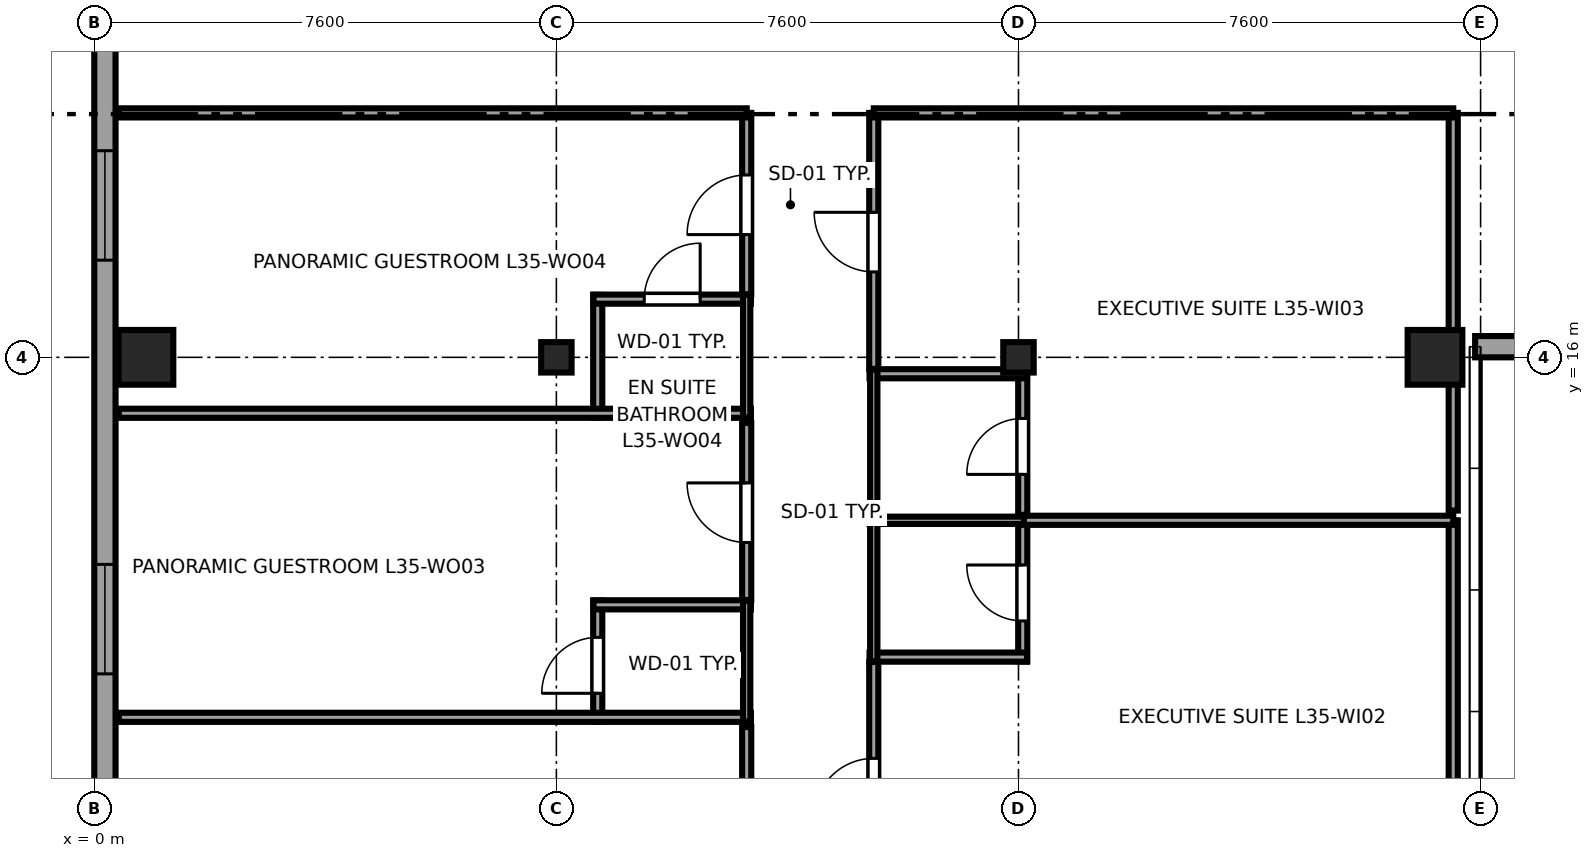
"""IFC4 building model, lengths in metres.
Left out: names, types, materials, properties, quantities, classifications, styles, units other than length and angle.
Written with IfcOpenShell. Run it as: python <this file> out.ifc"""

import sys

from ifc_helpers import new_model, si_unit, direction, frame, frame_2d, origin, origin_2d, place, context, subcontext, project, spatial, rectangle, i_section, extrude, source, transform, mapped, element, fill, save


model = new_model("IFC4")
c1 = context("Model", 3, precision=1e-05, world=origin(), true_north=direction((0.0, 1.0)))
c2 = subcontext(c1, "Body", "Model", "MODEL_VIEW")
j1 = project(units=[si_unit("LENGTHUNIT", "METRE"), si_unit("PLANEANGLEUNIT", "RADIAN")], contexts=[c1])
p1 = place(None, origin())
s1 = spatial("IfcSite", under=j1, at=p1, CompositionType="ELEMENT")
p2 = place(p1, origin())
s2 = spatial("IfcBuilding", under=s1, at=p2, CompositionType="ELEMENT")
p3 = place(p2, frame((0.0, 0.0, 136.4)))
s3 = spatial("IfcBuildingStorey", under=s2, at=p3, CompositionType="ELEMENT", Elevation=136.4)
m1 = source(origin(), c2, "Body", "SweptSolid", [
    extrude(rectangle(XDim=0.9, YDim=0.9, at=origin_2d()), origin(), (0.0, 0.0, 1.0), 3.55),
])
p4 = place(p3, frame((0.85, 16.0, 0.0), z_axis=(0.0, 0.0, 1.0), x_axis=(1.0, 0.0, 0.0)))
e1 = element("IfcColumn", 1, at=p4, inside=s3, PredefinedType="COLUMN", context=c2, shape_type="MappedRepresentation", body=[
    mapped(m1, transform((0.0, 0.0, 0.0), x_axis=(1.0, 0.0, 0.0), y_axis=(0.0, 1.0, 0.0), z_axis=(0.0, 0.0, 1.0), scale=1.0)),
])
m2 = source(origin(), c2, "Body", "SweptSolid", [
    extrude(i_section(OverallWidth=0.5, OverallDepth=0.5, WebThickness=0.022, FlangeThickness=0.034, at=origin_2d()), origin(), (0.0, 0.0, 1.0), 3.55),
])
for number, where, z_axis, x_axis in (
    (2, (7.6, 16.0, 0.0), (0.0, 0.0, 1.0), (1.0, 0.0, 0.0)),
    (3, (15.2, 16.0, 0.0), (0.0, 0.0, 1.0), (1.0, 0.0, 0.0)),
):
    element("IfcColumn", number, at=place(p3, frame(where, z_axis=z_axis, x_axis=x_axis)), inside=s3, PredefinedType="COLUMN", context=c2, shape_type="MappedRepresentation", body=[
        mapped(m2, transform((0.0, 0.0, 0.0), x_axis=(1.0, 0.0, 0.0), y_axis=(0.0, 1.0, 0.0), z_axis=(0.0, 0.0, 1.0), scale=1.0)),
    ])
p5 = place(p3, frame((22.05, 16.0, 0.0), z_axis=(0.0, 0.0, 1.0), x_axis=(1.0, 0.0, 0.0)))
e4 = element("IfcColumn", 4, at=p5, inside=s3, PredefinedType="COLUMN", context=c2, shape_type="MappedRepresentation", body=[
    mapped(m1, transform((0.0, 0.0, 0.0), x_axis=(1.0, 0.0, 0.0), y_axis=(0.0, 1.0, 0.0), z_axis=(0.0, 0.0, 1.0), scale=1.0)),
])
p6 = place(p3, frame((22.71, 16.175, 0.0), z_axis=(0.0, 0.0, 1.0), x_axis=(1.0, 0.0, 0.0)))
e5 = element("IfcWall", 5, at=p6, inside=s3, PredefinedType="SOLIDWALL", context=c2, shape_type="SweptSolid", body=[
    extrude(rectangle(XDim=11.58, YDim=0.35, at=frame_2d((5.79, 0.0))), origin(), (0.0, 0.0, 1.0), 2.748),
])
p7 = place(p6, frame((2.295, 0.0, 0.68)))
e6 = element("IfcOpeningElement", 6, at=p7, cuts=e5, PredefinedType="OPENING", context=c2, shape_type="SweptSolid", body=[
    extrude(rectangle(XDim=1.8, YDim=1.85, at=frame_2d((0.9, 0.925))), frame((0.0, 0.185, 0.0), z_axis=(0.0, -1.0, 0.0), x_axis=(1.0, 0.0, 0.0)), (0.0, 0.0, 1.0), 0.37),
])
p8 = place(p6, frame((7.485, 0.0, 0.68)))
e7 = element("IfcOpeningElement", 7, at=p8, cuts=e5, PredefinedType="OPENING", context=c2, shape_type="SweptSolid", body=[
    extrude(rectangle(XDim=1.8, YDim=1.85, at=frame_2d((0.9, 0.925))), frame((0.0, 0.185, 0.0), z_axis=(0.0, -1.0, 0.0), x_axis=(1.0, 0.0, 0.0)), (0.0, 0.0, 1.0), 0.37),
])
p9 = place(p3, frame((0.175, 41.383, 0.0), z_axis=(0.0, 0.0, 1.0), x_axis=(0.0, -1.0, 0.0)))
e8 = element("IfcWall", 8, at=p9, inside=s3, PredefinedType="SOLIDWALL", context=c2, shape_type="SweptSolid", body=[
    extrude(rectangle(XDim=36.766, YDim=0.35, at=frame_2d((18.383, 0.0))), origin(), (0.0, 0.0, 1.0), 3.37),
])
p10 = place(p9, frame((0.626, 0.0, 0.68)))
e9 = element("IfcOpeningElement", 9, at=p10, cuts=e8, PredefinedType="OPENING", context=c2, shape_type="SweptSolid", body=[
    extrude(rectangle(XDim=1.8, YDim=1.85, at=frame_2d((0.9, 0.925))), frame((0.0, 0.185, 0.0), z_axis=(0.0, -1.0, 0.0), x_axis=(1.0, 0.0, 0.0)), (0.0, 0.0, 1.0), 0.37),
])
p11 = place(p9, frame((9.579, 0.0, 0.68)))
e10 = element("IfcOpeningElement", 10, at=p11, cuts=e8, PredefinedType="OPENING", context=c2, shape_type="SweptSolid", body=[
    extrude(rectangle(XDim=1.8, YDim=1.85, at=frame_2d((0.9, 0.925))), frame((0.0, 0.185, 0.0), z_axis=(0.0, -1.0, 0.0), x_axis=(1.0, 0.0, 0.0)), (0.0, 0.0, 1.0), 0.37),
])
p12 = place(p9, frame((13.531, 0.0, 0.68)))
e11 = element("IfcOpeningElement", 11, at=p12, cuts=e8, PredefinedType="OPENING", context=c2, shape_type="SweptSolid", body=[
    extrude(rectangle(XDim=1.8, YDim=1.85, at=frame_2d((0.9, 0.925))), frame((0.0, 0.185, 0.0), z_axis=(0.0, -1.0, 0.0), x_axis=(1.0, 0.0, 0.0)), (0.0, 0.0, 1.0), 0.37),
])
p13 = place(p9, frame((21.985, 0.0, 0.68)))
e12 = element("IfcOpeningElement", 12, at=p13, cuts=e8, PredefinedType="OPENING", context=c2, shape_type="SweptSolid", body=[
    extrude(rectangle(XDim=1.8, YDim=1.85, at=frame_2d((0.9, 0.925))), frame((0.0, 0.185, 0.0), z_axis=(0.0, -1.0, 0.0), x_axis=(1.0, 0.0, 0.0)), (0.0, 0.0, 1.0), 0.37),
])
p14 = place(p9, frame((28.788, 0.0, 0.68)))
e13 = element("IfcOpeningElement", 13, at=p14, cuts=e8, PredefinedType="OPENING", context=c2, shape_type="SweptSolid", body=[
    extrude(rectangle(XDim=1.8, YDim=1.85, at=frame_2d((0.9, 0.925))), frame((0.0, 0.185, 0.0), z_axis=(0.0, -1.0, 0.0), x_axis=(1.0, 0.0, 0.0)), (0.0, 0.0, 1.0), 0.37),
])
p15 = place(p9, frame((34.34, 0.0, 0.68)))
e14 = element("IfcOpeningElement", 14, at=p15, cuts=e8, PredefinedType="OPENING", context=c2, shape_type="SweptSolid", body=[
    extrude(rectangle(XDim=1.8, YDim=1.85, at=frame_2d((0.9, 0.925))), frame((0.0, 0.185, 0.0), z_axis=(0.0, -1.0, 0.0), x_axis=(1.0, 0.0, 0.0)), (0.0, 0.0, 1.0), 0.37),
])
p16 = place(p3, frame((8.28, 10.01, 0.0), z_axis=(0.0, 0.0, 1.0), x_axis=(0.0, 1.0, 0.0)))
e15 = element("IfcWall", 15, at=p16, inside=s3, PredefinedType="PARTITIONING", context=c2, shape_type="SweptSolid", body=[
    extrude(rectangle(XDim=1.99, YDim=0.15, at=frame_2d((0.995, 0.0))), origin(), (0.0, 0.0, 1.0), 3.37),
])
p17 = place(p16, frame((0.465, 0.0, 0.0)))
e16 = element("IfcOpeningElement", 16, at=p17, cuts=e15, PredefinedType="OPENING", context=c2, shape_type="SweptSolid", body=[
    extrude(rectangle(XDim=0.92, YDim=2.01, at=frame_2d((0.46, 1.005))), frame((0.0, 0.085, 0.0), z_axis=(0.0, -1.0, 0.0), x_axis=(1.0, 0.0, 0.0)), (0.0, 0.0, 1.0), 0.17),
])
p18 = place(p3, frame((0.405, 10.08, 0.0), z_axis=(0.0, 0.0, 1.0), x_axis=(1.0, 0.0, 0.0)))
e17 = element("IfcWall", 17, at=p18, inside=s3, PredefinedType="PARTITIONING", context=c2, shape_type="SweptSolid", body=[
    extrude(rectangle(XDim=10.395, YDim=0.15, at=frame_2d((5.198, 0.0))), origin(), (0.0, 0.0, 1.0), 3.37),
])
p19 = place(p3, frame((8.21, 11.93, 0.0), z_axis=(0.0, 0.0, 1.0), x_axis=(1.0, 0.0, 0.0)))
e18 = element("IfcWall", 18, at=p19, inside=s3, PredefinedType="PARTITIONING", context=c2, shape_type="SweptSolid", body=[
    extrude(rectangle(XDim=2.59, YDim=0.15, at=frame_2d((1.295, 0.0))), origin(), (0.0, 0.0, 1.0), 3.37),
])
p20 = place(p3, frame((10.73, 10.01, 0.0), z_axis=(0.0, 0.0, 1.0), x_axis=(0.0, 1.0, 0.0)))
e19 = element("IfcWall", 19, at=p20, inside=s3, PredefinedType="PLUMBINGWALL", context=c2, shape_type="SweptSolid", body=[
    extrude(rectangle(XDim=1.99, YDim=0.12, at=frame_2d((0.995, 0.0))), origin(), (0.0, 0.0, 1.0), 3.37),
])
p21 = place(p3, frame((8.28, 15.01, 0.0), z_axis=(0.0, 0.0, 1.0), x_axis=(0.0, 1.0, 0.0)))
e20 = element("IfcWall", 20, at=p21, inside=s3, PredefinedType="PARTITIONING", context=c2, shape_type="SweptSolid", body=[
    extrude(rectangle(XDim=2.017, YDim=0.15, at=frame_2d((1.009, 0.0))), origin(), (0.0, 0.0, 1.0), 3.37),
])
p22 = place(p3, frame((0.405, 15.08, 0.0), z_axis=(0.0, 0.0, 1.0), x_axis=(1.0, 0.0, 0.0)))
e21 = element("IfcWall", 21, at=p22, inside=s3, PredefinedType="PARTITIONING", context=c2, shape_type="SweptSolid", body=[
    extrude(rectangle(XDim=10.395, YDim=0.15, at=frame_2d((5.198, 0.0))), origin(), (0.0, 0.0, 1.0), 3.37),
])
p23 = place(p3, frame((8.21, 16.957, 0.0), z_axis=(0.0, 0.0, 1.0), x_axis=(1.0, 0.0, 0.0)))
e22 = element("IfcWall", 22, at=p23, inside=s3, PredefinedType="PARTITIONING", context=c2, shape_type="SweptSolid", body=[
    extrude(rectangle(XDim=2.59, YDim=0.15, at=frame_2d((1.295, 0.0))), origin(), (0.0, 0.0, 1.0), 3.37),
])
p24 = place(p23, frame((0.835, 0.0, 0.0)))
e23 = element("IfcOpeningElement", 23, at=p24, cuts=e22, PredefinedType="OPENING", context=c2, shape_type="SweptSolid", body=[
    extrude(rectangle(XDim=0.92, YDim=2.01, at=frame_2d((0.46, 1.005))), frame((0.0, 0.085, 0.0), z_axis=(0.0, -1.0, 0.0), x_axis=(1.0, 0.0, 0.0)), (0.0, 0.0, 1.0), 0.17),
])
p25 = place(p3, frame((10.73, 15.01, 0.0), z_axis=(0.0, 0.0, 1.0), x_axis=(0.0, 1.0, 0.0)))
e24 = element("IfcWall", 24, at=p25, inside=s3, PredefinedType="PLUMBINGWALL", context=c2, shape_type="SweptSolid", body=[
    extrude(rectangle(XDim=2.017, YDim=0.12, at=frame_2d((1.009, 0.0))), origin(), (0.0, 0.0, 1.0), 3.37),
])
p26 = place(p3, frame((15.27, 11.0, 0.0), z_axis=(0.0, 0.0, 1.0), x_axis=(0.0, 1.0, 0.0)))
e25 = element("IfcWall", 25, at=p26, inside=s3, PredefinedType="PARTITIONING", context=c2, shape_type="SweptSolid", body=[
    extrude(rectangle(XDim=2.39, YDim=0.15, at=frame_2d((1.195, 0.0))), origin(), (0.0, 0.0, 1.0), 2.827),
])
p27 = place(p26, frame((0.665, 0.0, 0.0)))
e26 = element("IfcOpeningElement", 26, at=p27, cuts=e25, PredefinedType="OPENING", context=c2, shape_type="SweptSolid", body=[
    extrude(rectangle(XDim=0.92, YDim=2.01, at=frame_2d((0.46, 1.005))), frame((0.0, 0.085, 0.0), z_axis=(0.0, -1.0, 0.0), x_axis=(1.0, 0.0, 0.0)), (0.0, 0.0, 1.0), 0.17),
])
p28 = place(p3, frame((12.75, 11.07, 0.0), z_axis=(0.0, 0.0, 1.0), x_axis=(1.0, 0.0, 0.0)))
e27 = element("IfcWall", 27, at=p28, inside=s3, PredefinedType="PARTITIONING", context=c2, shape_type="SweptSolid", body=[
    extrude(rectangle(XDim=2.59, YDim=0.15, at=frame_2d((1.295, 0.0))), origin(), (0.0, 0.0, 1.0), 3.37),
])
p29 = place(p3, frame((12.75, 13.32, 0.0), z_axis=(0.0, 0.0, 1.0), x_axis=(1.0, 0.0, 0.0)))
e28 = element("IfcWall", 28, at=p29, inside=s3, PredefinedType="PLUMBINGWALL", context=c2, shape_type="SweptSolid", body=[
    extrude(rectangle(XDim=2.59, YDim=0.12, at=frame_2d((1.295, 0.0))), origin(), (0.0, 0.0, 1.0), 3.37),
])
p30 = place(p3, frame((12.82, 11.0, 0.0), z_axis=(0.0, 0.0, 1.0), x_axis=(0.0, 1.0, 0.0)))
e29 = element("IfcWall", 29, at=p30, inside=s3, PredefinedType="PLUMBINGWALL", context=c2, shape_type="SweptSolid", body=[
    extrude(rectangle(XDim=2.39, YDim=0.12, at=frame_2d((1.195, 0.0))), origin(), (0.0, 0.0, 1.0), 3.37),
])
p31 = place(p3, frame((15.27, 13.41, 0.0), z_axis=(0.0, 0.0, 1.0), x_axis=(0.0, 1.0, 0.0)))
e30 = element("IfcWall", 30, at=p31, inside=s3, PredefinedType="PARTITIONING", context=c2, shape_type="SweptSolid", body=[
    extrude(rectangle(XDim=2.39, YDim=0.15, at=frame_2d((1.195, 0.0))), origin(), (0.0, 0.0, 1.0), 2.827),
])
p32 = place(p31, frame((0.665, 0.0, 0.0)))
e31 = element("IfcOpeningElement", 31, at=p32, cuts=e30, PredefinedType="OPENING", context=c2, shape_type="SweptSolid", body=[
    extrude(rectangle(XDim=0.92, YDim=2.01, at=frame_2d((0.46, 1.005))), frame((0.0, 0.085, 0.0), z_axis=(0.0, -1.0, 0.0), x_axis=(1.0, 0.0, 0.0)), (0.0, 0.0, 1.0), 0.17),
])
p33 = place(p3, frame((12.75, 15.73, 0.0), z_axis=(0.0, 0.0, 1.0), x_axis=(1.0, 0.0, 0.0)))
e32 = element("IfcWall", 32, at=p33, inside=s3, PredefinedType="PARTITIONING", context=c2, shape_type="SweptSolid", body=[
    extrude(rectangle(XDim=2.59, YDim=0.15, at=frame_2d((1.295, 0.0))), origin(), (0.0, 0.0, 1.0), 3.37),
])
p34 = place(p3, frame((12.82, 13.41, 0.0), z_axis=(0.0, 0.0, 1.0), x_axis=(0.0, 1.0, 0.0)))
e33 = element("IfcWall", 33, at=p34, inside=s3, PredefinedType="PLUMBINGWALL", context=c2, shape_type="SweptSolid", body=[
    extrude(rectangle(XDim=2.39, YDim=0.12, at=frame_2d((1.195, 0.0))), origin(), (0.0, 0.0, 1.0), 3.37),
])
p35 = place(p3, frame((10.73, 6.937, 0.0), z_axis=(0.0, 0.0, 1.0), x_axis=(0.0, 1.0, 0.0)))
e34 = element("IfcWall", 34, at=p35, inside=s3, PredefinedType="PARTITIONING", context=c2, shape_type="SweptSolid", body=[
    extrude(rectangle(XDim=2.983, YDim=0.15, at=frame_2d((1.491, 0.0))), origin(), (0.0, 0.0, 1.0), 3.37),
])
p36 = place(p35, frame((0.981, 0.0, 0.0)))
e35 = element("IfcOpeningElement", 35, at=p36, cuts=e34, PredefinedType="OPENING", context=c2, shape_type="SweptSolid", body=[
    extrude(rectangle(XDim=0.98, YDim=2.12, at=frame_2d((0.49, 1.06))), frame((0.0, 0.085, 0.0), z_axis=(0.0, -1.0, 0.0), x_axis=(1.0, 0.0, 0.0)), (0.0, 0.0, 1.0), 0.17),
])
p37 = place(p3, frame((10.73, 12.01, 0.0), z_axis=(0.0, 0.0, 1.0), x_axis=(0.0, 1.0, 0.0)))
e36 = element("IfcWall", 36, at=p37, inside=s3, PredefinedType="PARTITIONING", context=c2, shape_type="SweptSolid", body=[
    extrude(rectangle(XDim=2.91, YDim=0.15, at=frame_2d((1.455, 0.0))), origin(), (0.0, 0.0, 1.0), 3.37),
])
p38 = place(p37, frame((0.945, 0.0, 0.0)))
e37 = element("IfcOpeningElement", 37, at=p38, cuts=e36, PredefinedType="OPENING", context=c2, shape_type="SweptSolid", body=[
    extrude(rectangle(XDim=0.98, YDim=2.12, at=frame_2d((0.49, 1.06))), frame((0.0, 0.085, 0.0), z_axis=(0.0, -1.0, 0.0), x_axis=(1.0, 0.0, 0.0)), (0.0, 0.0, 1.0), 0.17),
])
p39 = place(p3, frame((10.73, 17.037, 0.0), z_axis=(0.0, 0.0, 1.0), x_axis=(0.0, 1.0, 0.0)))
e38 = element("IfcWall", 38, at=p39, inside=s3, PredefinedType="PARTITIONING", context=c2, shape_type="SweptSolid", body=[
    extrude(rectangle(XDim=2.983, YDim=0.15, at=frame_2d((1.491, 0.0))), origin(), (0.0, 0.0, 1.0), 3.37),
])
p40 = place(p39, frame((0.981, 0.0, 0.0)))
e39 = element("IfcOpeningElement", 39, at=p40, cuts=e38, PredefinedType="OPENING", context=c2, shape_type="SweptSolid", body=[
    extrude(rectangle(XDim=0.98, YDim=2.12, at=frame_2d((0.49, 1.06))), frame((0.0, 0.085, 0.0), z_axis=(0.0, -1.0, 0.0), x_axis=(1.0, 0.0, 0.0)), (0.0, 0.0, 1.0), 0.17),
])
p41 = place(p3, frame((0.405, 20.02, 0.0), z_axis=(0.0, 0.0, 1.0), x_axis=(1.0, 0.0, 0.0)))
e40 = element("IfcWall", 40, at=p41, inside=s3, PredefinedType="PARTITIONING", context=c2, shape_type="SweptSolid", body=[
    extrude(rectangle(XDim=10.325, YDim=0.15, at=frame_2d((5.163, 0.0))), origin(), (0.0, 0.0, 1.0), 3.37),
])
p42 = place(p3, frame((12.82, 6.88, 0.0), z_axis=(0.0, 0.0, 1.0), x_axis=(0.0, 1.0, 0.0)))
e41 = element("IfcWall", 41, at=p42, inside=s3, PredefinedType="PARTITIONING", context=c2, shape_type="SweptSolid", body=[
    extrude(rectangle(XDim=4.11, YDim=0.15, at=frame_2d((2.055, 0.0))), origin(), (0.0, 0.0, 1.0), 3.37),
])
p43 = place(p42, frame((1.545, 0.0, 0.0)))
e42 = element("IfcOpeningElement", 42, at=p43, cuts=e41, PredefinedType="OPENING", context=c2, shape_type="SweptSolid", body=[
    extrude(rectangle(XDim=0.98, YDim=2.12, at=frame_2d((0.49, 1.06))), frame((0.0, 0.085, 0.0), z_axis=(0.0, -1.0, 0.0), x_axis=(1.0, 0.0, 0.0)), (0.0, 0.0, 1.0), 0.17),
])
p44 = place(p3, frame((22.35, 6.88, 0.0), z_axis=(0.0, 0.0, 1.0), x_axis=(0.0, 1.0, 0.0)))
e43 = element("IfcWall", 43, at=p44, inside=s3, PredefinedType="PARTITIONING", context=c2, shape_type="SweptSolid", body=[
    extrude(rectangle(XDim=6.44, YDim=0.15, at=frame_2d((3.22, 0.0))), origin(), (0.0, 0.0, 1.0), 3.37),
])
p45 = place(p3, frame((15.29, 13.32, 0.0), z_axis=(0.0, 0.0, 1.0), x_axis=(1.0, 0.0, 0.0)))
e44 = element("IfcWall", 44, at=p45, inside=s3, PredefinedType="PARTITIONING", context=c2, shape_type="SweptSolid", body=[
    extrude(rectangle(XDim=7.06, YDim=0.15, at=frame_2d((3.53, 0.0))), origin(), (0.0, 0.0, 1.0), 3.37),
])
p46 = place(p3, frame((12.82, 15.81, 0.0), z_axis=(0.0, 0.0, 1.0), x_axis=(0.0, 1.0, 0.0)))
e45 = element("IfcWall", 45, at=p46, inside=s3, PredefinedType="PARTITIONING", context=c2, shape_type="SweptSolid", body=[
    extrude(rectangle(XDim=4.21, YDim=0.15, at=frame_2d((2.105, 0.0))), origin(), (0.0, 0.0, 1.0), 3.37),
])
p47 = place(p46, frame((1.595, 0.0, 0.0)))
e46 = element("IfcOpeningElement", 46, at=p47, cuts=e45, PredefinedType="OPENING", context=c2, shape_type="SweptSolid", body=[
    extrude(rectangle(XDim=0.98, YDim=2.12, at=frame_2d((0.49, 1.06))), frame((0.0, 0.085, 0.0), z_axis=(0.0, -1.0, 0.0), x_axis=(1.0, 0.0, 0.0)), (0.0, 0.0, 1.0), 0.17),
])
p48 = place(p3, frame((22.35, 13.48, 0.0), z_axis=(0.0, 0.0, 1.0), x_axis=(0.0, 1.0, 0.0)))
e47 = element("IfcWall", 47, at=p48, inside=s3, PredefinedType="PARTITIONING", context=c2, shape_type="SweptSolid", body=[
    extrude(rectangle(XDim=6.54, YDim=0.15, at=frame_2d((3.27, 0.0))), origin(), (0.0, 0.0, 1.0), 3.37),
])
p49 = place(p3, frame((12.82, 20.02, 0.0), z_axis=(0.0, 0.0, 1.0), x_axis=(1.0, 0.0, 0.0)))
e48 = element("IfcWall", 48, at=p49, inside=s3, PredefinedType="PARTITIONING", context=c2, shape_type="SweptSolid", body=[
    extrude(rectangle(XDim=9.53, YDim=0.15, at=frame_2d((4.765, 0.0))), origin(), (0.0, 0.0, 1.0), 2.954),
])
m3 = source(origin(), c2, "Body", "SweptSolid", [
    extrude(rectangle(XDim=1.8, YDim=1.85, at=frame_2d((0.9, 0.925))), frame((0.0, 0.09, 0.0), z_axis=(0.0, -1.0, 0.0), x_axis=(1.0, 0.0, 0.0)), (0.0, 0.0, 1.0), 0.06),
])
p50 = place(p13, origin())
e49 = element("IfcWindow", 49, at=p50, inside=s3, PartitioningType="TRIPLE_PANEL_HORIZONTAL", PredefinedType="WINDOW", context=c2, shape_type="MappedRepresentation", body=[
    mapped(m3, transform((0.0, 0.0, 0.0), x_axis=(1.0, 0.0, 0.0), y_axis=(0.0, 1.0, 0.0), z_axis=(0.0, 0.0, 1.0), scale=1.0)),
])
fill(e12, e49)
p51 = place(p14, origin())
e50 = element("IfcWindow", 50, at=p51, inside=s3, PartitioningType="TRIPLE_PANEL_HORIZONTAL", PredefinedType="WINDOW", context=c2, shape_type="MappedRepresentation", body=[
    mapped(m3, transform((0.0, 0.0, 0.0), x_axis=(1.0, 0.0, 0.0), y_axis=(0.0, 1.0, 0.0), z_axis=(0.0, 0.0, 1.0), scale=1.0)),
])
fill(e13, e50)
m4 = source(origin(), c2, "Body", "SweptSolid", [
    extrude(rectangle(XDim=0.92, YDim=2.01, at=frame_2d((0.46, 1.005))), frame((0.0, 0.025, 0.0), z_axis=(0.0, -1.0, 0.0), x_axis=(1.0, 0.0, 0.0)), (0.0, 0.0, 1.0), 0.05),
])
p52 = place(p17, origin())
e51 = element("IfcDoor", 51, at=p52, inside=s3, OperationType="SINGLE_SWING_LEFT", PredefinedType="DOOR", context=c2, shape_type="MappedRepresentation", body=[
    mapped(m4, transform((0.0, 0.0, 0.0), x_axis=(1.0, 0.0, 0.0), y_axis=(0.0, 1.0, 0.0), z_axis=(0.0, 0.0, 1.0), scale=1.0)),
])
fill(e16, e51)
p53 = place(p24, origin())
e52 = element("IfcDoor", 52, at=p53, inside=s3, OperationType="SINGLE_SWING_RIGHT", PredefinedType="DOOR", context=c2, shape_type="MappedRepresentation", body=[
    mapped(m4, transform((0.0, 0.0, 0.0), x_axis=(1.0, 0.0, 0.0), y_axis=(0.0, 1.0, 0.0), z_axis=(0.0, 0.0, 1.0), scale=1.0)),
])
fill(e23, e52)
p54 = place(p27, origin())
e53 = element("IfcDoor", 53, at=p54, inside=s3, OperationType="SINGLE_SWING_RIGHT", PredefinedType="DOOR", context=c2, shape_type="MappedRepresentation", body=[
    mapped(m4, transform((0.0, 0.0, 0.0), x_axis=(1.0, 0.0, 0.0), y_axis=(0.0, 1.0, 0.0), z_axis=(0.0, 0.0, 1.0), scale=1.0)),
])
fill(e26, e53)
p55 = place(p32, origin())
e54 = element("IfcDoor", 54, at=p55, inside=s3, OperationType="SINGLE_SWING_LEFT", PredefinedType="DOOR", context=c2, shape_type="MappedRepresentation", body=[
    mapped(m4, transform((0.0, 0.0, 0.0), x_axis=(1.0, 0.0, 0.0), y_axis=(0.0, 1.0, 0.0), z_axis=(0.0, 0.0, 1.0), scale=1.0)),
])
fill(e31, e54)
m5 = source(origin(), c2, "Body", "SweptSolid", [
    extrude(rectangle(XDim=0.98, YDim=2.12, at=frame_2d((0.49, 1.06))), frame((0.0, 0.025, 0.0), z_axis=(0.0, -1.0, 0.0), x_axis=(1.0, 0.0, 0.0)), (0.0, 0.0, 1.0), 0.05),
])
p56 = place(p38, origin())
e55 = element("IfcDoor", 55, at=p56, inside=s3, OperationType="SINGLE_SWING_RIGHT", PredefinedType="DOOR", context=c2, shape_type="MappedRepresentation", body=[
    mapped(m5, transform((0.0, 0.0, 0.0), x_axis=(1.0, 0.0, 0.0), y_axis=(0.0, 1.0, 0.0), z_axis=(0.0, 0.0, 1.0), scale=1.0)),
])
fill(e37, e55)
p57 = place(p40, origin())
e56 = element("IfcDoor", 56, at=p57, inside=s3, OperationType="SINGLE_SWING_LEFT", PredefinedType="DOOR", context=c2, shape_type="MappedRepresentation", body=[
    mapped(m5, transform((0.0, 0.0, 0.0), x_axis=(1.0, 0.0, 0.0), y_axis=(0.0, 1.0, 0.0), z_axis=(0.0, 0.0, 1.0), scale=1.0)),
])
fill(e39, e56)
p58 = place(p43, origin())
e57 = element("IfcDoor", 57, at=p58, inside=s3, OperationType="SINGLE_SWING_LEFT", PredefinedType="DOOR", context=c2, shape_type="MappedRepresentation", body=[
    mapped(m5, transform((0.0, 0.0, 0.0), x_axis=(1.0, 0.0, 0.0), y_axis=(0.0, 1.0, 0.0), z_axis=(0.0, 0.0, 1.0), scale=1.0)),
])
fill(e42, e57)
p59 = place(p47, origin())
e58 = element("IfcDoor", 58, at=p59, inside=s3, OperationType="SINGLE_SWING_RIGHT", PredefinedType="DOOR", context=c2, shape_type="MappedRepresentation", body=[
    mapped(m5, transform((0.0, 0.0, 0.0), x_axis=(1.0, 0.0, 0.0), y_axis=(0.0, 1.0, 0.0), z_axis=(0.0, 0.0, 1.0), scale=1.0)),
])
fill(e46, e58)
save(model, sys.argv[1])
